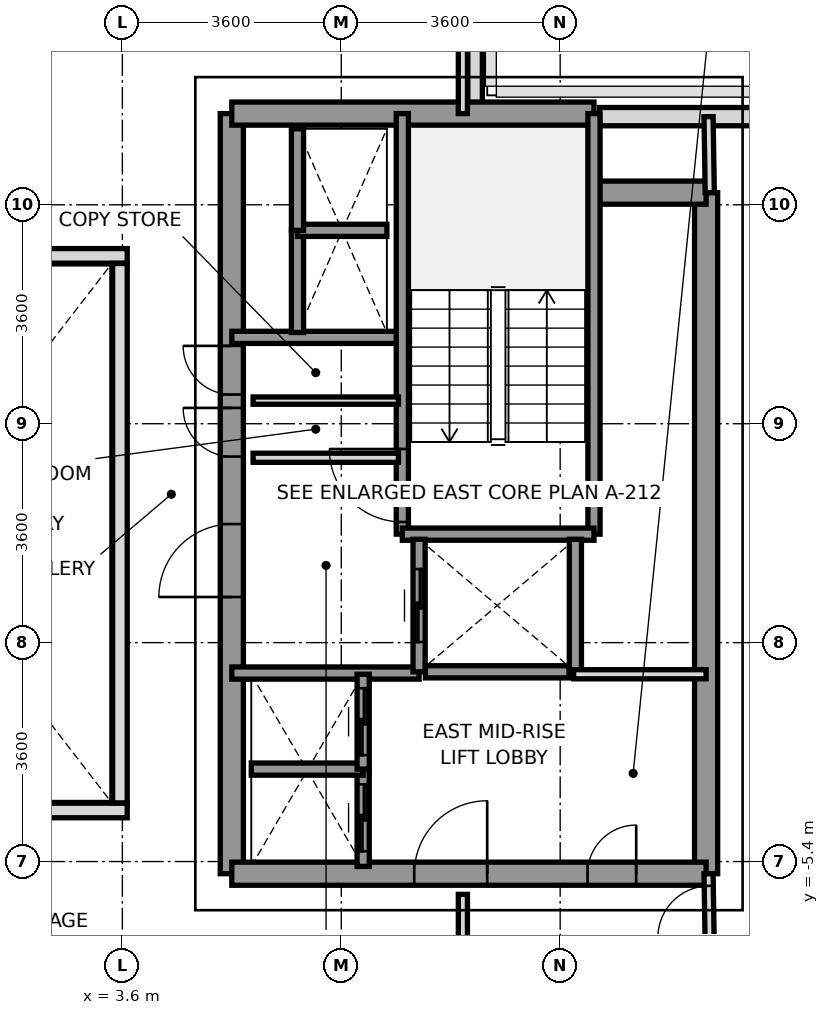
"""IFC4 building model, lengths in metres.
Left out: names, types, materials, properties, quantities, classifications, styles, units other than length and angle.
Written with IfcOpenShell. Run it as: python <this file> out.ifc"""

import sys

from ifc_helpers import new_model, si_unit, direction, frame, frame_2d, origin, place, context, subcontext, project, spatial, rectangle, extrude, source, transform, mapped, element, fill, save


model = new_model("IFC4")
c1 = context("Model", 3, precision=1e-05, world=origin(), true_north=direction((0.0, 1.0)))
c2 = subcontext(c1, "Body", "Model", "MODEL_VIEW")
j1 = project(units=[si_unit("LENGTHUNIT", "METRE"), si_unit("PLANEANGLEUNIT", "RADIAN")], contexts=[c1])
p1 = place(None, origin())
s1 = spatial("IfcSite", under=j1, at=p1, CompositionType="ELEMENT")
p2 = place(p1, origin())
s2 = spatial("IfcBuilding", under=s1, at=p2, CompositionType="ELEMENT")
p3 = place(p2, frame((0.0, 0.0, 160.4)))
s3 = spatial("IfcBuildingStorey", under=s2, at=p3, CompositionType="ELEMENT", Elevation=160.4)
p4 = place(p3, frame((11.448, 6.85, 0.0), z_axis=(0.0, 0.0, 1.0), x_axis=(1.0, 0.0, 0.0)))
e1 = element("IfcWall", 1, at=p4, inside=s3, PredefinedType="SOLIDWALL", context=c2, shape_type="SweptSolid", body=[
    extrude(rectangle(XDim=2.635, YDim=0.3, at=frame_2d((1.317, 0.0))), origin(), (0.0, 0.0, 1.0), 3.2),
])
p5 = place(p3, frame((9.4, 8.547, 0.0), z_axis=(0.0, 0.0, 1.0), x_axis=(0.0, -1.0, 0.0)))
e2 = element("IfcWall", 2, at=p5, inside=s3, PredefinedType="PARAPET", context=c2, shape_type="SweptSolid", body=[
    extrude(rectangle(XDim=1.594, YDim=0.24, at=frame_2d((0.797, 0.0))), origin(), (0.0, 0.0, 1.0), 1.15),
])
p6 = place(p3, frame((13.2, -5.6, 0.0), z_axis=(0.0, 0.0, 1.0), x_axis=(0.0, 1.0, 0.0)))
e3 = element("IfcWall", 3, at=p6, inside=s3, PredefinedType="SHEAR", context=c2, shape_type="SweptSolid", body=[
    extrude(rectangle(XDim=11.2, YDim=0.38, at=frame_2d((5.6, 0.0))), origin(), (0.0, 0.0, 1.0), 3.2),
])
p7 = place(p3, frame((5.4, -5.6, 0.0), z_axis=(0.0, 0.0, 1.0), x_axis=(0.0, 1.0, 0.0)))
e4 = element("IfcWall", 4, at=p7, inside=s3, PredefinedType="SHEAR", context=c2, shape_type="SweptSolid", body=[
    extrude(rectangle(XDim=12.5, YDim=0.38, at=frame_2d((6.25, 0.0))), origin(), (0.0, 0.0, 1.0), 3.2),
])
p8 = place(p7, frame((4.55, 0.0, 0.0)))
e5 = element("IfcOpeningElement", 5, at=p8, cuts=e4, PredefinedType="OPENING", context=c2, shape_type="SweptSolid", body=[
    extrude(rectangle(XDim=1.2, YDim=2.2, at=frame_2d((0.6, 1.1))), frame((0.0, 0.2, 0.0), z_axis=(0.0, -1.0, 0.0), x_axis=(1.0, 0.0, 0.0)), (0.0, 0.0, 1.0), 0.4),
])
p9 = place(p7, frame((6.86, 0.0, 0.0)))
e6 = element("IfcOpeningElement", 6, at=p9, cuts=e4, PredefinedType="OPENING", context=c2, shape_type="SweptSolid", body=[
    extrude(rectangle(XDim=0.8, YDim=2.1, at=frame_2d((0.4, 1.05))), frame((0.0, 0.2, 0.0), z_axis=(0.0, -1.0, 0.0), x_axis=(1.0, 0.0, 0.0)), (0.0, 0.0, 1.0), 0.4),
])
p10 = place(p7, frame((7.88, 0.0, 0.0)))
e7 = element("IfcOpeningElement", 7, at=p10, cuts=e4, PredefinedType="OPENING", context=c2, shape_type="SweptSolid", body=[
    extrude(rectangle(XDim=0.8, YDim=2.1, at=frame_2d((0.4, 1.05))), frame((0.0, 0.2, 0.0), z_axis=(0.0, -1.0, 0.0), x_axis=(1.0, 0.0, 0.0)), (0.0, 0.0, 1.0), 0.4),
])
p11 = place(p3, frame((5.4, 6.9, 0.0), z_axis=(0.0, 0.0, 1.0), x_axis=(1.0, 0.0, 0.0)))
e8 = element("IfcWall", 8, at=p11, inside=s3, PredefinedType="SHEAR", context=c2, shape_type="SweptSolid", body=[
    extrude(rectangle(XDim=5.956, YDim=0.38, at=frame_2d((2.978, 0.0))), origin(), (0.0, 0.0, 1.0), 3.2),
])
p12 = place(p3, frame((11.356, 5.6, 0.0), z_axis=(0.0, 0.0, 1.0), x_axis=(1.0, 0.0, 0.0)))
e9 = element("IfcWall", 9, at=p12, inside=s3, PredefinedType="SHEAR", context=c2, shape_type="SweptSolid", body=[
    extrude(rectangle(XDim=1.844, YDim=0.38, at=frame_2d((0.922, 0.0))), origin(), (0.0, 0.0, 1.0), 3.2),
])
p13 = place(p3, frame((5.4, -5.6, 0.0), z_axis=(0.0, 0.0, 1.0), x_axis=(1.0, 0.0, 0.0)))
e10 = element("IfcWall", 10, at=p13, inside=s3, PredefinedType="SHEAR", context=c2, shape_type="SweptSolid", body=[
    extrude(rectangle(XDim=7.8, YDim=0.38, at=frame_2d((3.9, 0.0))), origin(), (0.0, 0.0, 1.0), 3.2),
])
p14 = place(p13, frame((3.0, 0.0, 0.0)))
e11 = element("IfcOpeningElement", 11, at=p14, cuts=e10, PredefinedType="OPENING", context=c2, shape_type="SweptSolid", body=[
    extrude(rectangle(XDim=1.2, YDim=2.2, at=frame_2d((0.6, 1.1))), frame((0.0, 0.2, 0.0), z_axis=(0.0, -1.0, 0.0), x_axis=(1.0, 0.0, 0.0)), (0.0, 0.0, 1.0), 0.4),
])
p15 = place(p13, frame((5.85, 0.0, 0.0)))
e12 = element("IfcOpeningElement", 12, at=p15, cuts=e10, PredefinedType="OPENING", context=c2, shape_type="SweptSolid", body=[
    extrude(rectangle(XDim=0.8, YDim=2.1, at=frame_2d((0.4, 1.05))), frame((0.0, 0.2, 0.0), z_axis=(0.0, -1.0, 0.0), x_axis=(1.0, 0.0, 0.0)), (0.0, 0.0, 1.0), 0.4),
])
p16 = place(p3, frame((5.4, 3.22, 0.0), z_axis=(0.0, 0.0, 1.0), x_axis=(1.0, 0.0, 0.0)))
e13 = element("IfcWall", 13, at=p16, inside=s3, PredefinedType="SOLIDWALL", context=c2, shape_type="SweptSolid", body=[
    extrude(rectangle(XDim=2.78, YDim=0.2, at=frame_2d((1.39, 0.0))), origin(), (0.0, 0.0, 1.0), 3.2),
])
p17 = place(p3, frame((5.4, -2.3, 0.0), z_axis=(0.0, 0.0, 1.0), x_axis=(1.0, 0.0, 0.0)))
e14 = element("IfcWall", 14, at=p17, inside=s3, PredefinedType="SOLIDWALL", context=c2, shape_type="SweptSolid", body=[
    extrude(rectangle(XDim=3.08, YDim=0.2, at=frame_2d((1.54, 0.0))), origin(), (0.0, 0.0, 1.0), 3.2),
])
p18 = place(p3, frame((8.204, -0.016, 0.0), z_axis=(0.0, 0.0, 1.0), x_axis=(0.0, 1.0, 0.0)))
e15 = element("IfcWall", 15, at=p18, inside=s3, PredefinedType="SOLIDWALL", context=c2, shape_type="SweptSolid", body=[
    extrude(rectangle(XDim=6.916, YDim=0.2, at=frame_2d((3.458, 0.0))), origin(), (0.0, 0.0, 1.0), 3.2),
])
p19 = place(p18, frame((0.2, 0.0, 0.0)))
e16 = element("IfcOpeningElement", 16, at=p19, cuts=e15, PredefinedType="OPENING", context=c2, shape_type="SweptSolid", body=[
    extrude(rectangle(XDim=1.2, YDim=2.2, at=frame_2d((0.6, 1.1))), frame((0.0, 0.11, 0.0), z_axis=(0.0, -1.0, 0.0), x_axis=(1.0, 0.0, 0.0)), (0.0, 0.0, 1.0), 0.22),
])
p20 = place(p3, frame((11.356, -0.016, 0.0), z_axis=(0.0, 0.0, 1.0), x_axis=(0.0, 1.0, 0.0)))
e17 = element("IfcWall", 17, at=p20, inside=s3, PredefinedType="SOLIDWALL", context=c2, shape_type="SweptSolid", body=[
    extrude(rectangle(XDim=6.916, YDim=0.2, at=frame_2d((3.458, 0.0))), origin(), (0.0, 0.0, 1.0), 3.2),
])
p21 = place(p3, frame((8.204, -0.016, 0.0), z_axis=(0.0, 0.0, 1.0), x_axis=(1.0, 0.0, 0.0)))
e18 = element("IfcWall", 18, at=p21, inside=s3, PredefinedType="SOLIDWALL", context=c2, shape_type="SweptSolid", body=[
    extrude(rectangle(XDim=3.152, YDim=0.2, at=frame_2d((1.576, 0.0))), origin(), (0.0, 0.0, 1.0), 3.2),
])
p22 = place(p3, frame((8.48, -2.28, 0.0), z_axis=(0.0, 0.0, 1.0), x_axis=(0.0, 1.0, 0.0)))
e19 = element("IfcWall", 19, at=p22, inside=s3, PredefinedType="SOLIDWALL", context=c2, shape_type="SweptSolid", body=[
    extrude(rectangle(XDim=2.18, YDim=0.2, at=frame_2d((1.09, 0.0))), origin(), (0.0, 0.0, 1.0), 3.2),
])
p23 = place(p22, frame((0.49, 0.0, 0.0)))
e20 = element("IfcOpeningElement", 20, at=p23, cuts=e19, PredefinedType="OPENING", context=c2, shape_type="SweptSolid", body=[
    extrude(rectangle(XDim=1.2, YDim=2.2, at=frame_2d((0.6, 1.1))), frame((0.0, 0.11, 0.0), z_axis=(0.0, -1.0, 0.0), x_axis=(1.0, 0.0, 0.0)), (0.0, 0.0, 1.0), 0.22),
])
p24 = place(p3, frame((11.05, -2.28, 0.0), z_axis=(0.0, 0.0, 1.0), x_axis=(0.0, 1.0, 0.0)))
e21 = element("IfcWall", 21, at=p24, inside=s3, PredefinedType="SOLIDWALL", context=c2, shape_type="SweptSolid", body=[
    extrude(rectangle(XDim=2.18, YDim=0.2, at=frame_2d((1.09, 0.0))), origin(), (0.0, 0.0, 1.0), 3.2),
])
p25 = place(p3, frame((8.584, -2.28, 0.0), z_axis=(0.0, 0.0, 1.0), x_axis=(1.0, 0.0, 0.0)))
e22 = element("IfcWall", 22, at=p25, inside=s3, PredefinedType="SOLIDWALL", context=c2, shape_type="SweptSolid", body=[
    extrude(rectangle(XDim=2.362, YDim=0.2, at=frame_2d((1.181, 0.0))), origin(), (0.0, 0.0, 1.0), 3.2),
])
p26 = place(p3, frame((7.56, -5.48, 0.0), z_axis=(0.0, 0.0, 1.0), x_axis=(0.0, 1.0, 0.0)))
e23 = element("IfcWall", 23, at=p26, inside=s3, PredefinedType="SOLIDWALL", context=c2, shape_type="SweptSolid", body=[
    extrude(rectangle(XDim=1.6, YDim=0.2, at=frame_2d((0.8, 0.0))), origin(), (0.0, 0.0, 1.0), 3.2),
])
p27 = place(p26, frame((0.25, 0.0, 0.0)))
e24 = element("IfcOpeningElement", 24, at=p27, cuts=e23, PredefinedType="OPENING", context=c2, shape_type="SweptSolid", body=[
    extrude(rectangle(XDim=1.1, YDim=2.2, at=frame_2d((0.55, 1.1))), frame((0.0, 0.11, 0.0), z_axis=(0.0, -1.0, 0.0), x_axis=(1.0, 0.0, 0.0)), (0.0, 0.0, 1.0), 0.22),
])
p28 = place(p3, frame((5.72, -3.88, 0.0), z_axis=(0.0, 0.0, 1.0), x_axis=(1.0, 0.0, 0.0)))
e25 = element("IfcWall", 25, at=p28, inside=s3, PredefinedType="SOLIDWALL", context=c2, shape_type="SweptSolid", body=[
    extrude(rectangle(XDim=1.84, YDim=0.2, at=frame_2d((0.92, 0.0))), origin(), (0.0, 0.0, 1.0), 3.2),
])
p29 = place(p3, frame((7.56, -3.88, 0.0), z_axis=(0.0, 0.0, 1.0), x_axis=(0.0, 1.0, 0.0)))
e26 = element("IfcWall", 26, at=p29, inside=s3, PredefinedType="SOLIDWALL", context=c2, shape_type="SweptSolid", body=[
    extrude(rectangle(XDim=1.56, YDim=0.2, at=frame_2d((0.78, 0.0))), origin(), (0.0, 0.0, 1.0), 3.2),
])
p30 = place(p29, frame((0.23, 0.0, 0.0)))
e27 = element("IfcOpeningElement", 27, at=p30, cuts=e26, PredefinedType="OPENING", context=c2, shape_type="SweptSolid", body=[
    extrude(rectangle(XDim=1.1, YDim=2.2, at=frame_2d((0.55, 1.1))), frame((0.0, 0.11, 0.0), z_axis=(0.0, -1.0, 0.0), x_axis=(1.0, 0.0, 0.0)), (0.0, 0.0, 1.0), 0.22),
])
p31 = place(p3, frame((6.48, 3.3, 0.0), z_axis=(0.0, 0.0, 1.0), x_axis=(0.0, 1.0, 0.0)))
e28 = element("IfcWall", 28, at=p31, inside=s3, PredefinedType="SOLIDWALL", context=c2, shape_type="SweptSolid", body=[
    extrude(rectangle(XDim=1.68, YDim=0.2, at=frame_2d((0.84, 0.0))), origin(), (0.0, 0.0, 1.0), 3.2),
])
p32 = place(p3, frame((6.48, 4.98, 0.0), z_axis=(0.0, 0.0, 1.0), x_axis=(1.0, 0.0, 0.0)))
e29 = element("IfcWall", 29, at=p32, inside=s3, PredefinedType="SOLIDWALL", context=c2, shape_type="SweptSolid", body=[
    extrude(rectangle(XDim=1.47, YDim=0.2, at=frame_2d((0.735, 0.0))), origin(), (0.0, 0.0, 1.0), 3.2),
])
p33 = place(p3, frame((6.48, 4.98, 0.0), z_axis=(0.0, 0.0, 1.0), x_axis=(0.0, 1.0, 0.0)))
e30 = element("IfcWall", 30, at=p33, inside=s3, PredefinedType="SOLIDWALL", context=c2, shape_type="SweptSolid", body=[
    extrude(rectangle(XDim=1.67, YDim=0.2, at=frame_2d((0.835, 0.0))), origin(), (0.0, 0.0, 1.0), 3.2),
])
p34 = place(p3, frame((5.75, 1.24, 0.0), z_axis=(0.0, 0.0, 1.0), x_axis=(1.0, 0.0, 0.0)))
e31 = element("IfcWall", 31, at=p34, inside=s3, PredefinedType="PARTITIONING", context=c2, shape_type="SweptSolid", body=[
    extrude(rectangle(XDim=2.39, YDim=0.15, at=frame_2d((1.195, 0.0))), origin(), (0.0, 0.0, 1.0), 2.3),
])
p35 = place(p3, frame((5.75, 2.18, 0.0), z_axis=(0.0, 0.0, 1.0), x_axis=(1.0, 0.0, 0.0)))
e32 = element("IfcWall", 32, at=p35, inside=s3, PredefinedType="PARTITIONING", context=c2, shape_type="SweptSolid", body=[
    extrude(rectangle(XDim=2.39, YDim=0.12, at=frame_2d((1.195, 0.0))), origin(), (0.0, 0.0, 1.0), 2.3),
])
p36 = place(p3, frame((11.02, -2.32, 0.0), z_axis=(0.0, 0.0, 1.0), x_axis=(1.0, 0.0, 0.0)))
e33 = element("IfcWall", 33, at=p36, inside=s3, PredefinedType="PARTITIONING", context=c2, shape_type="SweptSolid", body=[
    extrude(rectangle(XDim=2.18, YDim=0.15, at=frame_2d((1.09, 0.0))), origin(), (0.0, 0.0, 1.0), 3.2),
])
p37 = place(p3, frame((9.2, 6.9, 0.0), z_axis=(0.0, 0.0, 1.0), x_axis=(0.0, 1.0, 0.0)))
e34 = element("IfcWall", 34, at=p37, inside=s3, PredefinedType="PARTITIONING", context=c2, shape_type="SweptSolid", body=[
    extrude(rectangle(XDim=8.78, YDim=0.15, at=frame_2d((4.39, 0.0))), origin(), (0.0, 0.0, 1.0), 2.75),
])
p38 = place(p3, frame((9.2, -15.68, 0.0), z_axis=(0.0, 0.0, 1.0), x_axis=(0.0, 1.0, 0.0)))
e35 = element("IfcWall", 35, at=p38, inside=s3, PredefinedType="PARTITIONING", context=c2, shape_type="SweptSolid", body=[
    extrude(rectangle(XDim=9.74, YDim=0.15, at=frame_2d((4.87, 0.0))), origin(), (0.0, 0.0, 1.0), 2.75),
])
p39 = place(p3, frame((13.26, 5.6, 0.0), z_axis=(0.0, 0.0, 1.0), x_axis=(-0.016013571389, 0.999871774545, 0.0)))
e36 = element("IfcWall", 36, at=p39, inside=s3, PredefinedType="PARTITIONING", context=c2, shape_type="SweptSolid", body=[
    extrude(rectangle(XDim=1.25, YDim=0.15, at=frame_2d((0.625, 0.0))), origin(), (0.0, 0.0, 1.0), 3.2),
])
p40 = place(p3, frame((13.26, -6.85, 0.0), z_axis=(0.0, 0.0, 1.0), x_axis=(-0.016013571389, 0.999871774545, 0.0)))
e37 = element("IfcWall", 37, at=p40, inside=s3, PredefinedType="PARTITIONING", context=c2, shape_type="SweptSolid", body=[
    extrude(rectangle(XDim=1.25, YDim=0.15, at=frame_2d((0.625, 0.0))), origin(), (0.0, 0.0, 1.0), 3.2),
])
p41 = place(p40, frame((0.2, 0.0, 0.0)))
e38 = element("IfcOpeningElement", 38, at=p41, cuts=e37, PredefinedType="OPENING", context=c2, shape_type="SweptSolid", body=[
    extrude(rectangle(XDim=0.85, YDim=2.1, at=frame_2d((0.425, 1.05))), frame((0.0, 0.085, 0.0), z_axis=(0.0, -1.0, 0.0), x_axis=(1.0, 0.0, 0.0)), (0.0, 0.0, 1.0), 0.17),
])
for number, where, z_axis, x_axis in (
    (39, (-3.68, -4.56, 0.0), (0.0, 0.0, 1.0), (1.0, 0.0, 0.0)),
    (40, (-3.68, 4.56, 0.0), (0.0, 0.0, 1.0), (1.0, 0.0, 0.0)),
):
    element("IfcWall", number, at=place(p3, frame(where, z_axis=z_axis, x_axis=x_axis)), inside=s3, PredefinedType="PARAPET", context=c2, shape_type="SweptSolid", body=[
        extrude(rectangle(XDim=7.36, YDim=0.24, at=frame_2d((3.68, 0.0))), origin(), (0.0, 0.0, 1.0), 1.15),
    ])
p42 = place(p3, frame((3.56, -4.435, 0.0), z_axis=(0.0, 0.0, 1.0), x_axis=(0.0, 1.0, 0.0)))
e41 = element("IfcWall", 41, at=p42, inside=s3, PredefinedType="PARAPET", context=c2, shape_type="SweptSolid", body=[
    extrude(rectangle(XDim=8.87, YDim=0.24, at=frame_2d((4.435, 0.0))), origin(), (0.0, 0.0, 1.0), 1.15),
])
m1 = source(origin(), c2, "Body", "SweptSolid", [
    extrude(rectangle(XDim=1.2, YDim=2.2, at=frame_2d((0.6, 1.1))), frame((0.0, 0.025, 0.0), z_axis=(0.0, -1.0, 0.0), x_axis=(1.0, 0.0, 0.0)), (0.0, 0.0, 1.0), 0.05),
])
p43 = place(p19, origin())
e42 = element("IfcDoor", 42, at=p43, inside=s3, OperationType="SINGLE_SWING_RIGHT", PredefinedType="DOOR", context=c2, shape_type="MappedRepresentation", body=[
    mapped(m1, transform((0.0, 0.0, 0.0), x_axis=(1.0, 0.0, 0.0), y_axis=(0.0, 1.0, 0.0), z_axis=(0.0, 0.0, 1.0), scale=1.0)),
])
fill(e16, e42)
p44 = place(p8, origin())
e43 = element("IfcDoor", 43, at=p44, inside=s3, OperationType="SINGLE_SWING_LEFT", PredefinedType="DOOR", context=c2, shape_type="MappedRepresentation", body=[
    mapped(m1, transform((0.0, 0.0, 0.0), x_axis=(1.0, 0.0, 0.0), y_axis=(0.0, 1.0, 0.0), z_axis=(0.0, 0.0, 1.0), scale=1.0)),
])
fill(e5, e43)
p45 = place(p14, origin())
e44 = element("IfcDoor", 44, at=p45, inside=s3, OperationType="SINGLE_SWING_RIGHT", PredefinedType="DOOR", context=c2, shape_type="MappedRepresentation", body=[
    mapped(m1, transform((0.0, 0.0, 0.0), x_axis=(1.0, 0.0, 0.0), y_axis=(0.0, 1.0, 0.0), z_axis=(0.0, 0.0, 1.0), scale=1.0)),
])
fill(e11, e44)
m2 = source(origin(), c2, "Body", "SweptSolid", [
    extrude(rectangle(XDim=0.8, YDim=2.1, at=frame_2d((0.4, 1.05))), frame((0.0, 0.025, 0.0), z_axis=(0.0, -1.0, 0.0), x_axis=(1.0, 0.0, 0.0)), (0.0, 0.0, 1.0), 0.05),
])
p46 = place(p9, origin())
e45 = element("IfcDoor", 45, at=p46, inside=s3, OperationType="SINGLE_SWING_RIGHT", PredefinedType="DOOR", context=c2, shape_type="MappedRepresentation", body=[
    mapped(m2, transform((0.0, 0.0, 0.0), x_axis=(1.0, 0.0, 0.0), y_axis=(0.0, 1.0, 0.0), z_axis=(0.0, 0.0, 1.0), scale=1.0)),
])
fill(e6, e45)
p47 = place(p10, origin())
e46 = element("IfcDoor", 46, at=p47, inside=s3, OperationType="SINGLE_SWING_RIGHT", PredefinedType="DOOR", context=c2, shape_type="MappedRepresentation", body=[
    mapped(m2, transform((0.0, 0.0, 0.0), x_axis=(1.0, 0.0, 0.0), y_axis=(0.0, 1.0, 0.0), z_axis=(0.0, 0.0, 1.0), scale=1.0)),
])
fill(e7, e46)
p48 = place(p15, origin())
e47 = element("IfcDoor", 47, at=p48, inside=s3, OperationType="SINGLE_SWING_RIGHT", PredefinedType="DOOR", context=c2, shape_type="MappedRepresentation", body=[
    mapped(m2, transform((0.0, 0.0, 0.0), x_axis=(1.0, 0.0, 0.0), y_axis=(0.0, 1.0, 0.0), z_axis=(0.0, 0.0, 1.0), scale=1.0)),
])
fill(e12, e47)
p49 = place(p23, origin())
e48 = element("IfcDoor", 48, at=p49, inside=s3, OperationType="SLIDING_TO_RIGHT", PredefinedType="DOOR", context=c2, shape_type="MappedRepresentation", body=[
    mapped(m1, transform((0.0, 0.0, 0.0), x_axis=(1.0, 0.0, 0.0), y_axis=(0.0, 1.0, 0.0), z_axis=(0.0, 0.0, 1.0), scale=1.0)),
])
fill(e20, e48)
m3 = source(origin(), c2, "Body", "SweptSolid", [
    extrude(rectangle(XDim=1.1, YDim=2.2, at=frame_2d((0.55, 1.1))), frame((0.0, 0.025, 0.0), z_axis=(0.0, -1.0, 0.0), x_axis=(1.0, 0.0, 0.0)), (0.0, 0.0, 1.0), 0.05),
])
p50 = place(p27, origin())
e49 = element("IfcDoor", 49, at=p50, inside=s3, OperationType="SLIDING_TO_LEFT", PredefinedType="DOOR", context=c2, shape_type="MappedRepresentation", body=[
    mapped(m3, transform((0.0, 0.0, 0.0), x_axis=(1.0, 0.0, 0.0), y_axis=(0.0, 1.0, 0.0), z_axis=(0.0, 0.0, 1.0), scale=1.0)),
])
fill(e24, e49)
p51 = place(p30, origin())
e50 = element("IfcDoor", 50, at=p51, inside=s3, OperationType="SLIDING_TO_LEFT", PredefinedType="DOOR", context=c2, shape_type="MappedRepresentation", body=[
    mapped(m3, transform((0.0, 0.0, 0.0), x_axis=(1.0, 0.0, 0.0), y_axis=(0.0, 1.0, 0.0), z_axis=(0.0, 0.0, 1.0), scale=1.0)),
])
fill(e27, e50)
m4 = source(origin(), c2, "Body", "SweptSolid", [
    extrude(rectangle(XDim=0.85, YDim=2.1, at=frame_2d((0.425, 1.05))), frame((0.0, 0.025, 0.0), z_axis=(0.0, -1.0, 0.0), x_axis=(1.0, 0.0, 0.0)), (0.0, 0.0, 1.0), 0.05),
])
p52 = place(p41, origin())
e51 = element("IfcDoor", 51, at=p52, inside=s3, OperationType="SINGLE_SWING_LEFT", PredefinedType="DOOR", context=c2, shape_type="MappedRepresentation", body=[
    mapped(m4, transform((0.0, 0.0, 0.0), x_axis=(1.0, 0.0, 0.0), y_axis=(0.0, 1.0, 0.0), z_axis=(0.0, 0.0, 1.0), scale=1.0)),
])
fill(e38, e51)
save(model, sys.argv[1])
